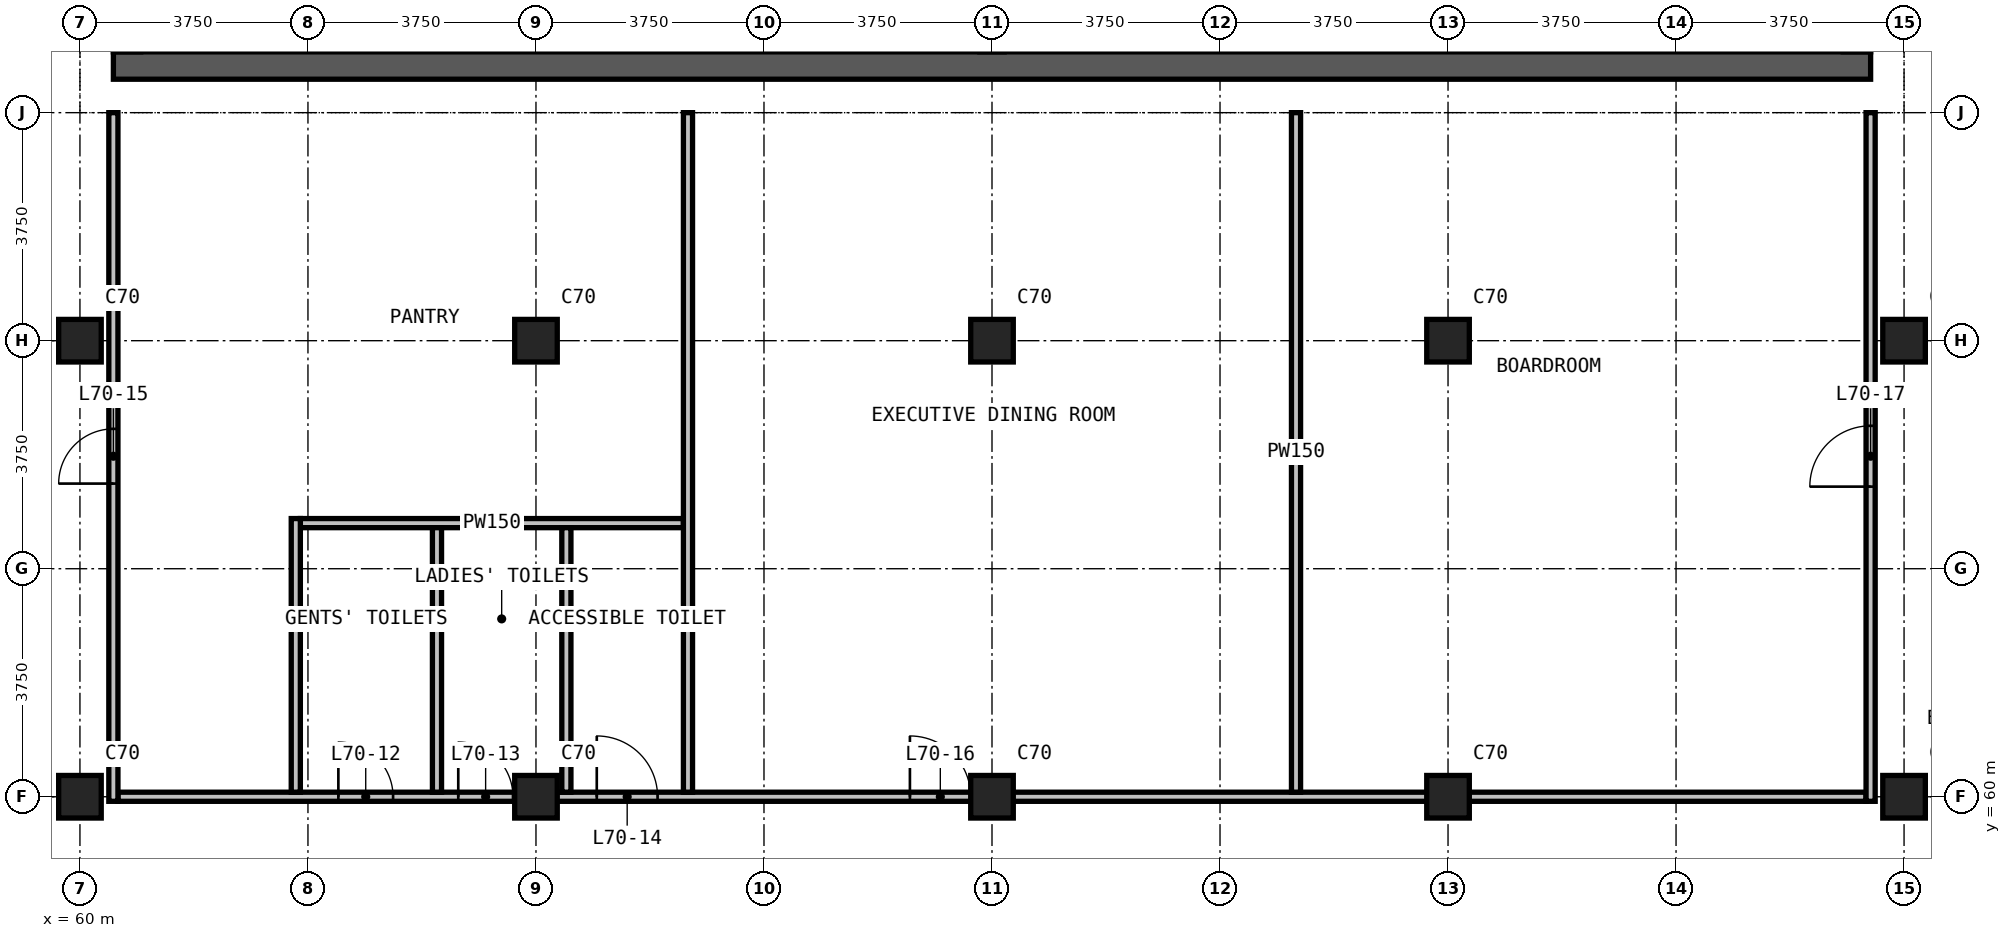
"""IFC4 building model, lengths in metres.
Left out: names, types, materials, properties, quantities, classifications, styles, units other than length and angle.
Written with IfcOpenShell. Run it as: python <this file> out.ifc"""

import sys

from ifc_helpers import new_model, si_unit, direction, frame, frame_2d, origin, origin_2d, place, context, subcontext, project, spatial, rectangle, extrude, element, fill, save


model = new_model("IFC4")
c1 = context("Model", 3, precision=1e-05, world=origin(), true_north=direction((0.0, 1.0)))
c2 = subcontext(c1, "Body", "Model", "MODEL_VIEW")
j1 = project(units=[si_unit("LENGTHUNIT", "METRE"), si_unit("PLANEANGLEUNIT", "RADIAN")], contexts=[c1])
p1 = place(None, origin())
s1 = spatial("IfcSite", under=j1, at=p1, CompositionType="ELEMENT")
p2 = place(p1, origin())
s2 = spatial("IfcBuilding", under=s1, at=p2, CompositionType="ELEMENT")
p3 = place(p2, frame((0.0, 0.0, 269.3)))
s3 = spatial("IfcBuildingStorey", under=s2, at=p3, CompositionType="ELEMENT", Elevation=269.3)
for number, where, z_axis, x_axis in (
    (1, (60.0, 60.0, 0.0), (0.0, 0.0, 1.0), (1.0, 0.0, 0.0)),
    (2, (60.0, 67.5, 0.0), (0.0, 0.0, 1.0), (1.0, 0.0, 0.0)),
    (3, (67.5, 60.0, 0.0), (0.0, 0.0, 1.0), (1.0, 0.0, 0.0)),
    (4, (67.5, 67.5, 0.0), (0.0, 0.0, 1.0), (1.0, 0.0, 0.0)),
    (5, (75.0, 60.0, 0.0), (0.0, 0.0, 1.0), (1.0, 0.0, 0.0)),
    (6, (75.0, 67.5, 0.0), (0.0, 0.0, 1.0), (1.0, 0.0, 0.0)),
    (7, (82.5, 60.0, 0.0), (0.0, 0.0, 1.0), (1.0, 0.0, 0.0)),
    (8, (82.5, 67.5, 0.0), (0.0, 0.0, 1.0), (1.0, 0.0, 0.0)),
    (9, (90.0, 60.0, 0.0), (0.0, 0.0, 1.0), (1.0, 0.0, 0.0)),
    (10, (90.0, 67.5, 0.0), (0.0, 0.0, 1.0), (1.0, 0.0, 0.0)),
):
    element("IfcColumn", number, at=place(p3, frame(where, z_axis=z_axis, x_axis=x_axis)), inside=s3, PredefinedType="COLUMN", context=c2, shape_type="SweptSolid", body=[
        extrude(rectangle(XDim=0.7, YDim=0.7, at=origin_2d()), origin(), (0.0, 0.0, 1.0), 3.6),
    ])
p4 = place(p3, frame((60.55, 72.025, 0.0), z_axis=(0.0, 0.0, 1.0), x_axis=(1.0, 0.0, 0.0)))
e11 = element("IfcWall", 11, at=p4, inside=s3, PredefinedType="SHEAR", context=c2, shape_type="SweptSolid", body=[
    extrude(rectangle(XDim=28.9, YDim=0.45, at=frame_2d((14.45, 0.0))), origin(), (0.0, 0.0, 1.0), 3.6),
])
p5 = place(p3, frame((60.625, 60.0, 0.0), z_axis=(0.0, 0.0, 1.0), x_axis=(1.0, 0.0, 0.0)))
e12 = element("IfcWall", 12, at=p5, inside=s3, PredefinedType="PARTITIONING", context=c2, shape_type="SweptSolid", body=[
    extrude(rectangle(XDim=28.75, YDim=0.15, at=frame_2d((14.375, 0.0))), origin(), (0.0, 0.0, 1.0), 3.3),
])
p6 = place(p5, frame((3.625, 0.0, 0.0)))
e13 = element("IfcOpeningElement", 13, at=p6, cuts=e12, PredefinedType="OPENING", context=c2, shape_type="SweptSolid", body=[
    extrude(rectangle(XDim=0.9, YDim=2.2, at=frame_2d((0.45, 1.1))), frame((0.0, 0.085, 0.0), z_axis=(0.0, -1.0, 0.0), x_axis=(1.0, 0.0, 0.0)), (0.0, 0.0, 1.0), 0.17),
])
p7 = place(p5, frame((5.597, 0.0, 0.0)))
e14 = element("IfcOpeningElement", 14, at=p7, cuts=e12, PredefinedType="OPENING", context=c2, shape_type="SweptSolid", body=[
    extrude(rectangle(XDim=0.9, YDim=2.2, at=frame_2d((0.45, 1.1))), frame((0.0, 0.085, 0.0), z_axis=(0.0, -1.0, 0.0), x_axis=(1.0, 0.0, 0.0)), (0.0, 0.0, 1.0), 0.17),
])
p8 = place(p5, frame((7.875, 0.0, 0.0)))
e15 = element("IfcOpeningElement", 15, at=p8, cuts=e12, PredefinedType="OPENING", context=c2, shape_type="SweptSolid", body=[
    extrude(rectangle(XDim=1.0, YDim=2.2, at=frame_2d((0.5, 1.1))), frame((0.0, 0.085, 0.0), z_axis=(0.0, -1.0, 0.0), x_axis=(1.0, 0.0, 0.0)), (0.0, 0.0, 1.0), 0.17),
])
p9 = place(p5, frame((13.025, 0.0, 0.0)))
e16 = element("IfcOpeningElement", 16, at=p9, cuts=e12, PredefinedType="OPENING", context=c2, shape_type="SweptSolid", body=[
    extrude(rectangle(XDim=1.0, YDim=2.2, at=frame_2d((0.5, 1.1))), frame((0.0, 0.085, 0.0), z_axis=(0.0, -1.0, 0.0), x_axis=(1.0, 0.0, 0.0)), (0.0, 0.0, 1.0), 0.17),
])
p10 = place(p3, frame((63.625, 64.5, 0.0), z_axis=(0.0, 0.0, 1.0), x_axis=(1.0, 0.0, 0.0)))
e17 = element("IfcWall", 17, at=p10, inside=s3, PredefinedType="PARTITIONING", context=c2, shape_type="SweptSolid", body=[
    extrude(rectangle(XDim=6.3, YDim=0.15, at=frame_2d((3.15, 0.0))), origin(), (0.0, 0.0, 1.0), 3.3),
])
p11 = place(p3, frame((60.55, 59.925, 0.0), z_axis=(0.0, 0.0, 1.0), x_axis=(0.0, 1.0, 0.0)))
e18 = element("IfcWall", 18, at=p11, inside=s3, PredefinedType="PARTITIONING", context=c2, shape_type="SweptSolid", body=[
    extrude(rectangle(XDim=11.325, YDim=0.15, at=frame_2d((5.663, 0.0))), origin(), (0.0, 0.0, 1.0), 3.3),
])
p12 = place(p11, frame((5.225, 0.0, 0.0)))
e19 = element("IfcOpeningElement", 19, at=p12, cuts=e18, PredefinedType="OPENING", context=c2, shape_type="SweptSolid", body=[
    extrude(rectangle(XDim=0.9, YDim=2.2, at=frame_2d((0.45, 1.1))), frame((0.0, 0.085, 0.0), z_axis=(0.0, -1.0, 0.0), x_axis=(1.0, 0.0, 0.0)), (0.0, 0.0, 1.0), 0.17),
])
p13 = place(p3, frame((63.55, 60.075, 0.0), z_axis=(0.0, 0.0, 1.0), x_axis=(0.0, 1.0, 0.0)))
e20 = element("IfcWall", 20, at=p13, inside=s3, PredefinedType="PARTITIONING", context=c2, shape_type="SweptSolid", body=[
    extrude(rectangle(XDim=4.5, YDim=0.15, at=frame_2d((2.25, 0.0))), origin(), (0.0, 0.0, 1.0), 3.3),
])
for number, where, z_axis, x_axis in (
    (21, (65.872, 60.075, 0.0), (0.0, 0.0, 1.0), (0.0, 1.0, 0.0)),
    (22, (68.0, 60.075, 0.0), (0.0, 0.0, 1.0), (0.0, 1.0, 0.0)),
):
    element("IfcWall", number, at=place(p3, frame(where, z_axis=z_axis, x_axis=x_axis)), inside=s3, PredefinedType="PARTITIONING", context=c2, shape_type="SweptSolid", body=[
        extrude(rectangle(XDim=4.35, YDim=0.15, at=frame_2d((2.175, 0.0))), origin(), (0.0, 0.0, 1.0), 3.3),
    ])
for number, where, z_axis, x_axis in (
    (23, (70.0, 60.075, 0.0), (0.0, 0.0, 1.0), (0.0, 1.0, 0.0)),
    (24, (80.0, 60.075, 0.0), (0.0, 0.0, 1.0), (0.0, 1.0, 0.0)),
):
    element("IfcWall", number, at=place(p3, frame(where, z_axis=z_axis, x_axis=x_axis)), inside=s3, PredefinedType="PARTITIONING", context=c2, shape_type="SweptSolid", body=[
        extrude(rectangle(XDim=11.175, YDim=0.15, at=frame_2d((5.587, 0.0))), origin(), (0.0, 0.0, 1.0), 3.3),
    ])
p14 = place(p3, frame((89.45, 59.925, 0.0), z_axis=(0.0, 0.0, 1.0), x_axis=(0.0, 1.0, 0.0)))
e25 = element("IfcWall", 25, at=p14, inside=s3, PredefinedType="PARTITIONING", context=c2, shape_type="SweptSolid", body=[
    extrude(rectangle(XDim=11.325, YDim=0.15, at=frame_2d((5.663, 0.0))), origin(), (0.0, 0.0, 1.0), 3.3),
])
p15 = place(p14, frame((5.175, 0.0, 0.0)))
e26 = element("IfcOpeningElement", 26, at=p15, cuts=e25, PredefinedType="OPENING", context=c2, shape_type="SweptSolid", body=[
    extrude(rectangle(XDim=1.0, YDim=2.2, at=frame_2d((0.5, 1.1))), frame((0.0, 0.085, 0.0), z_axis=(0.0, -1.0, 0.0), x_axis=(1.0, 0.0, 0.0)), (0.0, 0.0, 1.0), 0.17),
])
p16 = place(p6, origin())
e27 = element("IfcDoor", 27, at=p16, inside=s3, OperationType="SINGLE_SWING_RIGHT", PredefinedType="DOOR", context=c2, shape_type="SweptSolid", body=[
    extrude(rectangle(XDim=0.9, YDim=2.2, at=frame_2d((0.45, 1.1))), frame((0.0, 0.025, 0.0), z_axis=(0.0, -1.0, 0.0), x_axis=(1.0, 0.0, 0.0)), (0.0, 0.0, 1.0), 0.05),
])
fill(e13, e27)
p17 = place(p7, origin())
e28 = element("IfcDoor", 28, at=p17, inside=s3, OperationType="SINGLE_SWING_LEFT", PredefinedType="DOOR", context=c2, shape_type="SweptSolid", body=[
    extrude(rectangle(XDim=0.9, YDim=2.2, at=frame_2d((0.45, 1.1))), frame((0.0, 0.025, 0.0), z_axis=(0.0, -1.0, 0.0), x_axis=(1.0, 0.0, 0.0)), (0.0, 0.0, 1.0), 0.05),
])
fill(e14, e28)
p18 = place(p8, origin())
e29 = element("IfcDoor", 29, at=p18, inside=s3, OperationType="SINGLE_SWING_LEFT", PredefinedType="DOOR", context=c2, shape_type="SweptSolid", body=[
    extrude(rectangle(XDim=1.0, YDim=2.2, at=frame_2d((0.5, 1.1))), frame((0.0, 0.025, 0.0), z_axis=(0.0, -1.0, 0.0), x_axis=(1.0, 0.0, 0.0)), (0.0, 0.0, 1.0), 0.05),
])
fill(e15, e29)
p19 = place(p12, origin())
e30 = element("IfcDoor", 30, at=p19, inside=s3, OperationType="SINGLE_SWING_LEFT", PredefinedType="DOOR", context=c2, shape_type="SweptSolid", body=[
    extrude(rectangle(XDim=0.9, YDim=2.2, at=frame_2d((0.45, 1.1))), frame((0.0, 0.025, 0.0), z_axis=(0.0, -1.0, 0.0), x_axis=(1.0, 0.0, 0.0)), (0.0, 0.0, 1.0), 0.05),
])
fill(e19, e30)
p20 = place(p9, origin())
e31 = element("IfcDoor", 31, at=p20, inside=s3, OperationType="SINGLE_SWING_RIGHT", PredefinedType="DOOR", context=c2, shape_type="SweptSolid", body=[
    extrude(rectangle(XDim=1.0, YDim=2.2, at=frame_2d((0.5, 1.1))), frame((0.0, 0.025, 0.0), z_axis=(0.0, -1.0, 0.0), x_axis=(1.0, 0.0, 0.0)), (0.0, 0.0, 1.0), 0.05),
])
fill(e16, e31)
p21 = place(p15, origin())
e32 = element("IfcDoor", 32, at=p21, inside=s3, OperationType="SINGLE_SWING_LEFT", PredefinedType="DOOR", context=c2, shape_type="SweptSolid", body=[
    extrude(rectangle(XDim=1.0, YDim=2.2, at=frame_2d((0.5, 1.1))), frame((0.0, 0.025, 0.0), z_axis=(0.0, -1.0, 0.0), x_axis=(1.0, 0.0, 0.0)), (0.0, 0.0, 1.0), 0.05),
])
fill(e26, e32)
save(model, sys.argv[1])
